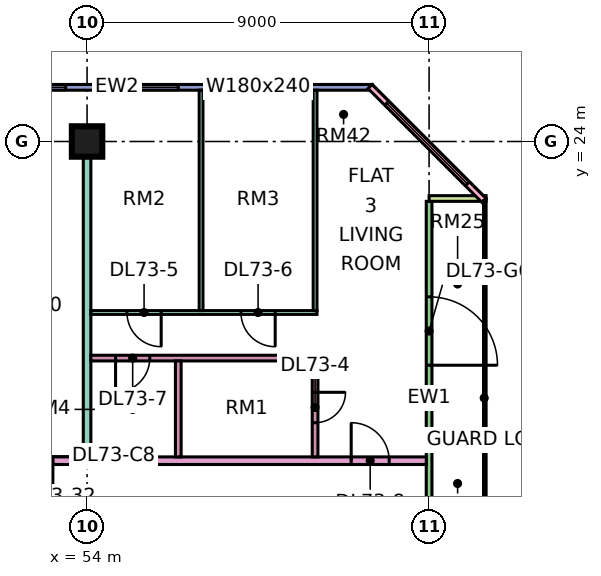
"""IFC4 building model, lengths in metres.
Left out: names, types, materials, properties, quantities, classifications, styles, units other than length and angle.
Written with IfcOpenShell. Run it as: python <this file> out.ifc"""

import sys

from ifc_helpers import new_model, si_unit, direction, frame, frame_2d, origin, origin_2d, place, context, subcontext, project, spatial, rectangle, extrude, element, fill, save


model = new_model("IFC4")
c1 = context("Model", 3, precision=1e-05, world=origin(), true_north=direction((0.0, 1.0)))
c2 = subcontext(c1, "Body", "Model", "MODEL_VIEW")
j1 = project(units=[si_unit("LENGTHUNIT", "METRE"), si_unit("PLANEANGLEUNIT", "RADIAN")], contexts=[c1])
p1 = place(None, origin())
s1 = spatial("IfcSite", under=j1, at=p1, CompositionType="ELEMENT")
p2 = place(p1, origin())
s2 = spatial("IfcBuilding", under=s1, at=p2, CompositionType="ELEMENT")
p3 = place(p2, frame((0.0, 0.0, 310.9)))
s3 = spatial("IfcBuildingStorey", under=s2, at=p3, CompositionType="ELEMENT", Elevation=310.9)
p4 = place(p3, frame((54.0, 24.0, 0.0), z_axis=(0.0, 0.0, 1.0), x_axis=(1.0, 0.0, 0.0)))
e1 = element("IfcColumn", 1, at=p4, inside=s3, PredefinedType="COLUMN", context=c2, shape_type="SweptSolid", body=[
    extrude(rectangle(XDim=0.8, YDim=0.8, at=origin_2d()), origin(), (0.0, 0.0, 1.0), 3.75),
])
p5 = place(p3, frame((61.5, 25.425, 0.0), z_axis=(0.0, 0.0, 1.0), x_axis=(-1.0, 0.0, 0.0)))
e2 = element("IfcWall", 2, at=p5, inside=s3, PredefinedType="SOLIDWALL", context=c2, shape_type="SweptSolid", body=[
    extrude(rectangle(XDim=13.425, YDim=0.15, at=frame_2d((6.712, 0.0))), origin(), (0.0, 0.0, 1.0), 3.35),
])
p6 = place(p5, frame((2.1, 0.0, 0.45)))
e3 = element("IfcOpeningElement", 3, at=p6, cuts=e2, PredefinedType="OPENING", context=c2, shape_type="SweptSolid", body=[
    extrude(rectangle(XDim=1.8, YDim=2.4, at=frame_2d((0.9, 1.2))), frame((0.0, 0.085, 0.0), z_axis=(0.0, -1.0, 0.0), x_axis=(1.0, 0.0, 0.0)), (0.0, 0.0, 1.0), 0.17),
])
p7 = place(p5, frame((5.1, 0.0, 0.45)))
e4 = element("IfcOpeningElement", 4, at=p7, cuts=e2, PredefinedType="OPENING", context=c2, shape_type="SweptSolid", body=[
    extrude(rectangle(XDim=1.8, YDim=2.4, at=frame_2d((0.9, 1.2))), frame((0.0, 0.085, 0.0), z_axis=(0.0, -1.0, 0.0), x_axis=(1.0, 0.0, 0.0)), (0.0, 0.0, 1.0), 0.17),
])
p8 = place(p5, frame((8.062, 0.0, 0.45)))
e5 = element("IfcOpeningElement", 5, at=p8, cuts=e2, PredefinedType="OPENING", context=c2, shape_type="SweptSolid", body=[
    extrude(rectangle(XDim=4.8, YDim=2.4, at=frame_2d((2.4, 1.2))), frame((0.0, 0.085, 0.0), z_axis=(0.0, -1.0, 0.0), x_axis=(1.0, 0.0, 0.0)), (0.0, 0.0, 1.0), 0.17),
])
p9 = place(p3, frame((63.0, 12.075, 0.0), z_axis=(0.0, 0.0, 1.0), x_axis=(0.0, 1.0, 0.0)))
e6 = element("IfcWall", 6, at=p9, inside=s3, PredefinedType="SOLIDWALL", context=c2, shape_type="SweptSolid", body=[
    extrude(rectangle(XDim=10.35, YDim=0.15, at=frame_2d((5.175, 0.0))), origin(), (0.0, 0.0, 1.0), 3.35),
])
p10 = place(p9, frame((6.038, 0.0, 0.0)))
e7 = element("IfcOpeningElement", 7, at=p10, cuts=e6, PredefinedType="OPENING", context=c2, shape_type="SweptSolid", body=[
    extrude(rectangle(XDim=1.8, YDim=2.4, at=frame_2d((0.9, 1.2))), frame((0.0, 0.085, 0.0), z_axis=(0.0, -1.0, 0.0), x_axis=(1.0, 0.0, 0.0)), (0.0, 0.0, 1.0), 0.17),
])
p11 = place(p3, frame((64.5, 22.5, 0.0), z_axis=(0.0, 0.0, 1.0), x_axis=(-1.0, 0.0, 0.0)))
e8 = element("IfcWall", 8, at=p11, inside=s3, PredefinedType="SOLIDWALL", context=c2, shape_type="SweptSolid", body=[
    extrude(rectangle(XDim=1.5, YDim=0.15, at=frame_2d((0.75, 0.0))), origin(), (0.0, 0.0, 1.0), 3.35),
])
p12 = place(p3, frame((64.447, 22.447, 0.0), z_axis=(0.0, 0.0, 1.0), x_axis=(-0.707106781187, 0.707106781187, 0.0)))
e9 = element("IfcWall", 9, at=p12, inside=s3, PredefinedType="SOLIDWALL", context=c2, shape_type="SweptSolid", body=[
    extrude(rectangle(XDim=4.243, YDim=0.15, at=frame_2d((2.121, 0.0))), origin(), (0.0, 0.0, 1.0), 3.35),
])
p13 = place(p12, frame((0.621, 0.0, 0.45)))
e10 = element("IfcOpeningElement", 10, at=p13, cuts=e9, PredefinedType="OPENING", context=c2, shape_type="SweptSolid", body=[
    extrude(rectangle(XDim=3.0, YDim=2.4, at=frame_2d((1.5, 1.2))), frame((0.0, 0.085, 0.0), z_axis=(0.0, -1.0, 0.0), x_axis=(1.0, 0.0, 0.0)), (0.0, 0.0, 1.0), 0.17),
])
p14 = place(p3, frame((51.225, 15.6, 0.0), z_axis=(0.0, 0.0, 1.0), x_axis=(1.0, 0.0, 0.0)))
e11 = element("IfcWall", 11, at=p14, inside=s3, PredefinedType="PARTITIONING", context=c2, shape_type="SweptSolid", body=[
    extrude(rectangle(XDim=11.701, YDim=0.2, at=frame_2d((5.851, 0.0))), origin(), (0.0, 0.0, 1.0), 3.35),
])
p15 = place(p14, frame((9.725, 0.0, 0.0)))
e12 = element("IfcOpeningElement", 12, at=p15, cuts=e11, PredefinedType="OPENING", context=c2, shape_type="SweptSolid", body=[
    extrude(rectangle(XDim=1.0, YDim=2.1, at=frame_2d((0.5, 1.05))), frame((0.0, 0.11, 0.0), z_axis=(0.0, -1.0, 0.0), x_axis=(1.0, 0.0, 0.0)), (0.0, 0.0, 1.0), 0.22),
])
p16 = place(p14, frame((0.875, 0.0, 0.0)))
e13 = element("IfcOpeningElement", 13, at=p16, cuts=e11, PredefinedType="OPENING", context=c2, shape_type="SweptSolid", body=[
    extrude(rectangle(XDim=1.0, YDim=2.1, at=frame_2d((0.5, 1.05))), frame((0.0, 0.11, 0.0), z_axis=(0.0, -1.0, 0.0), x_axis=(1.0, 0.0, 0.0)), (0.0, 0.0, 1.0), 0.22),
])
p17 = place(p3, frame((54.0, 15.7, 0.0), z_axis=(0.0, 0.0, 1.0), x_axis=(0.0, 1.0, 0.0)))
e14 = element("IfcWall", 14, at=p17, inside=s3, PredefinedType="PARTITIONING", context=c2, shape_type="SweptSolid", body=[
    extrude(rectangle(XDim=8.3, YDim=0.2, at=frame_2d((4.15, 0.0))), origin(), (0.0, 0.0, 1.0), 3.35),
])
p18 = place(p3, frame((54.1, 18.3, 0.0), z_axis=(0.0, 0.0, 1.0), x_axis=(1.0, 0.0, 0.0)))
e15 = element("IfcWall", 15, at=p18, inside=s3, PredefinedType="PARTITIONING", context=c2, shape_type="SweptSolid", body=[
    extrude(rectangle(XDim=5.975, YDim=0.15, at=frame_2d((2.987, 0.0))), origin(), (0.0, 0.0, 1.0), 3.35),
])
p19 = place(p18, frame((0.65, 0.0, 0.0)))
e16 = element("IfcOpeningElement", 16, at=p19, cuts=e15, PredefinedType="OPENING", context=c2, shape_type="SweptSolid", body=[
    extrude(rectangle(XDim=0.9, YDim=2.1, at=frame_2d((0.45, 1.05))), frame((0.0, 0.085, 0.0), z_axis=(0.0, -1.0, 0.0), x_axis=(1.0, 0.0, 0.0)), (0.0, 0.0, 1.0), 0.17),
])
p20 = place(p3, frame((54.1, 19.5, 0.0), z_axis=(0.0, 0.0, 1.0), x_axis=(1.0, 0.0, 0.0)))
e17 = element("IfcWall", 17, at=p20, inside=s3, PredefinedType="PARTITIONING", context=c2, shape_type="SweptSolid", body=[
    extrude(rectangle(XDim=5.95, YDim=0.1, at=frame_2d((2.975, 0.0))), origin(), (0.0, 0.0, 1.0), 3.35),
])
p21 = place(p20, frame((0.95, 0.0, 0.0)))
e18 = element("IfcOpeningElement", 18, at=p21, cuts=e17, PredefinedType="OPENING", context=c2, shape_type="SweptSolid", body=[
    extrude(rectangle(XDim=0.9, YDim=2.1, at=frame_2d((0.45, 1.05))), frame((0.0, 0.06, 0.0), z_axis=(0.0, -1.0, 0.0), x_axis=(1.0, 0.0, 0.0)), (0.0, 0.0, 1.0), 0.12),
])
p22 = place(p20, frame((3.95, 0.0, 0.0)))
e19 = element("IfcOpeningElement", 19, at=p22, cuts=e17, PredefinedType="OPENING", context=c2, shape_type="SweptSolid", body=[
    extrude(rectangle(XDim=0.9, YDim=2.1, at=frame_2d((0.45, 1.05))), frame((0.0, 0.06, 0.0), z_axis=(0.0, -1.0, 0.0), x_axis=(1.0, 0.0, 0.0)), (0.0, 0.0, 1.0), 0.12),
])
p23 = place(p3, frame((56.4, 15.7, 0.0), z_axis=(0.0, 0.0, 1.0), x_axis=(0.0, 1.0, 0.0)))
e20 = element("IfcWall", 20, at=p23, inside=s3, PredefinedType="PARTITIONING", context=c2, shape_type="SweptSolid", body=[
    extrude(rectangle(XDim=2.525, YDim=0.15, at=frame_2d((1.263, 0.0))), origin(), (0.0, 0.0, 1.0), 3.35),
])
p24 = place(p3, frame((57.0, 19.55, 0.0), z_axis=(0.0, 0.0, 1.0), x_axis=(0.0, 1.0, 0.0)))
e21 = element("IfcWall", 21, at=p24, inside=s3, PredefinedType="PARTITIONING", context=c2, shape_type="SweptSolid", body=[
    extrude(rectangle(XDim=5.801, YDim=0.1, at=frame_2d((2.9, 0.0))), origin(), (0.0, 0.0, 1.0), 3.35),
])
p25 = place(p3, frame((60.0, 15.7, 0.0), z_axis=(0.0, 0.0, 1.0), x_axis=(0.0, 1.0, 0.0)))
e22 = element("IfcWall", 22, at=p25, inside=s3, PredefinedType="PARTITIONING", context=c2, shape_type="SweptSolid", body=[
    extrude(rectangle(XDim=2.525, YDim=0.15, at=frame_2d((1.263, 0.0))), origin(), (0.0, 0.0, 1.0), 3.35),
])
p26 = place(p25, frame((0.9, 0.0, 0.0)))
e23 = element("IfcOpeningElement", 23, at=p26, cuts=e22, PredefinedType="OPENING", context=c2, shape_type="SweptSolid", body=[
    extrude(rectangle(XDim=0.8, YDim=2.1, at=frame_2d((0.4, 1.05))), frame((0.0, 0.085, 0.0), z_axis=(0.0, -1.0, 0.0), x_axis=(1.0, 0.0, 0.0)), (0.0, 0.0, 1.0), 0.17),
])
p27 = place(p3, frame((60.0, 19.55, 0.0), z_axis=(0.0, 0.0, 1.0), x_axis=(0.0, 1.0, 0.0)))
e24 = element("IfcWall", 24, at=p27, inside=s3, PredefinedType="PARTITIONING", context=c2, shape_type="SweptSolid", body=[
    extrude(rectangle(XDim=5.8, YDim=0.1, at=frame_2d((2.9, 0.0))), origin(), (0.0, 0.0, 1.0), 3.35),
])
p28 = place(p6, origin())
e25 = element("IfcWindow", 25, at=p28, inside=s3, PartitioningType="SINGLE_PANEL", PredefinedType="WINDOW", context=c2, shape_type="SweptSolid", body=[
    extrude(rectangle(XDim=1.8, YDim=2.4, at=frame_2d((0.9, 1.2))), frame((0.0, 0.03, 0.0), z_axis=(0.0, -1.0, 0.0), x_axis=(1.0, 0.0, 0.0)), (0.0, 0.0, 1.0), 0.06),
])
fill(e3, e25)
p29 = place(p7, origin())
e26 = element("IfcWindow", 26, at=p29, inside=s3, PartitioningType="SINGLE_PANEL", PredefinedType="WINDOW", context=c2, shape_type="SweptSolid", body=[
    extrude(rectangle(XDim=1.8, YDim=2.4, at=frame_2d((0.9, 1.2))), frame((0.0, 0.03, 0.0), z_axis=(0.0, -1.0, 0.0), x_axis=(1.0, 0.0, 0.0)), (0.0, 0.0, 1.0), 0.06),
])
fill(e4, e26)
p30 = place(p8, origin())
e27 = element("IfcWindow", 27, at=p30, inside=s3, PartitioningType="SINGLE_PANEL", PredefinedType="WINDOW", context=c2, shape_type="SweptSolid", body=[
    extrude(rectangle(XDim=4.8, YDim=2.4, at=frame_2d((2.4, 1.2))), frame((0.0, 0.03, 0.0), z_axis=(0.0, -1.0, 0.0), x_axis=(1.0, 0.0, 0.0)), (0.0, 0.0, 1.0), 0.06),
])
fill(e5, e27)
p31 = place(p10, frame((1.8, 0.0, 0.0), z_axis=(0.0, 0.0, 1.0), x_axis=(-1.0, 0.0, 0.0)))
e28 = element("IfcDoor", 28, at=p31, inside=s3, OperationType="DOUBLE_DOOR_SINGLE_SWING", PredefinedType="DOOR", context=c2, shape_type="SweptSolid", body=[
    extrude(rectangle(XDim=1.8, YDim=2.4, at=frame_2d((0.9, 1.2))), frame((0.0, 0.025, 0.0), z_axis=(0.0, -1.0, 0.0), x_axis=(1.0, 0.0, 0.0)), (0.0, 0.0, 1.0), 0.05),
])
fill(e7, e28)
p32 = place(p13, origin())
e29 = element("IfcWindow", 29, at=p32, inside=s3, PartitioningType="SINGLE_PANEL", PredefinedType="WINDOW", context=c2, shape_type="SweptSolid", body=[
    extrude(rectangle(XDim=3.0, YDim=2.4, at=frame_2d((1.5, 1.2))), frame((0.0, 0.03, 0.0), z_axis=(0.0, -1.0, 0.0), x_axis=(1.0, 0.0, 0.0)), (0.0, 0.0, 1.0), 0.06),
])
fill(e10, e29)
p33 = place(p26, origin())
e30 = element("IfcDoor", 30, at=p33, inside=s3, OperationType="SINGLE_SWING_RIGHT", PredefinedType="DOOR", context=c2, shape_type="SweptSolid", body=[
    extrude(rectangle(XDim=0.8, YDim=2.1, at=frame_2d((0.4, 1.05))), frame((0.0, 0.025, 0.0), z_axis=(0.0, -1.0, 0.0), x_axis=(1.0, 0.0, 0.0)), (0.0, 0.0, 1.0), 0.05),
])
fill(e23, e30)
p34 = place(p21, origin())
e31 = element("IfcDoor", 31, at=p34, inside=s3, OperationType="SINGLE_SWING_RIGHT", PredefinedType="DOOR", context=c2, shape_type="SweptSolid", body=[
    extrude(rectangle(XDim=0.9, YDim=2.1, at=frame_2d((0.45, 1.05))), frame((0.0, 0.025, 0.0), z_axis=(0.0, -1.0, 0.0), x_axis=(1.0, 0.0, 0.0)), (0.0, 0.0, 1.0), 0.05),
])
fill(e18, e31)
p35 = place(p22, origin())
e32 = element("IfcDoor", 32, at=p35, inside=s3, OperationType="SINGLE_SWING_RIGHT", PredefinedType="DOOR", context=c2, shape_type="SweptSolid", body=[
    extrude(rectangle(XDim=0.9, YDim=2.1, at=frame_2d((0.45, 1.05))), frame((0.0, 0.025, 0.0), z_axis=(0.0, -1.0, 0.0), x_axis=(1.0, 0.0, 0.0)), (0.0, 0.0, 1.0), 0.05),
])
fill(e19, e32)
p36 = place(p19, frame((0.9, 0.0, 0.0), z_axis=(0.0, 0.0, 1.0), x_axis=(-1.0, 0.0, 0.0)))
e33 = element("IfcDoor", 33, at=p36, inside=s3, OperationType="SINGLE_SWING_LEFT", PredefinedType="DOOR", context=c2, shape_type="SweptSolid", body=[
    extrude(rectangle(XDim=0.9, YDim=2.1, at=frame_2d((0.45, 1.05))), frame((0.0, 0.025, 0.0), z_axis=(0.0, -1.0, 0.0), x_axis=(1.0, 0.0, 0.0)), (0.0, 0.0, 1.0), 0.05),
])
fill(e16, e33)
p37 = place(p15, origin())
e34 = element("IfcDoor", 34, at=p37, inside=s3, OperationType="SINGLE_SWING_LEFT", PredefinedType="DOOR", context=c2, shape_type="SweptSolid", body=[
    extrude(rectangle(XDim=1.0, YDim=2.1, at=frame_2d((0.5, 1.05))), frame((0.0, 0.025, 0.0), z_axis=(0.0, -1.0, 0.0), x_axis=(1.0, 0.0, 0.0)), (0.0, 0.0, 1.0), 0.05),
])
fill(e12, e34)
p38 = place(p16, origin())
e35 = element("IfcDoor", 35, at=p38, inside=s3, OperationType="SINGLE_SWING_RIGHT", PredefinedType="DOOR", context=c2, shape_type="SweptSolid", body=[
    extrude(rectangle(XDim=1.0, YDim=2.1, at=frame_2d((0.5, 1.05))), frame((0.0, 0.025, 0.0), z_axis=(0.0, -1.0, 0.0), x_axis=(1.0, 0.0, 0.0)), (0.0, 0.0, 1.0), 0.05),
])
fill(e13, e35)
save(model, sys.argv[1])
